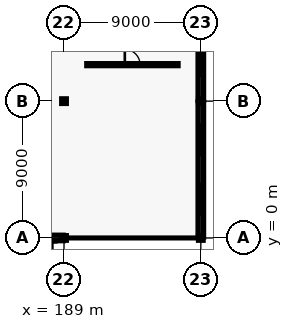
"""IFC4 building model, lengths in metres.
Left out: names, types, materials, properties, quantities, classifications, styles, units other than length and angle.
Written with IfcOpenShell. Run it as: python <this file> out.ifc"""

import sys

from ifc_helpers import new_model, si_unit, direction, frame, frame_2d, origin, origin_2d, place, context, subcontext, project, spatial, rectangle, i_section, extrude, element, fill, save


model = new_model("IFC4")
c1 = context("Model", 3, precision=1e-05, world=origin(), true_north=direction((0.0, 1.0)))
c2 = subcontext(c1, "Body", "Model", "MODEL_VIEW")
j1 = project(units=[si_unit("LENGTHUNIT", "METRE"), si_unit("PLANEANGLEUNIT", "RADIAN")], contexts=[c1])
p1 = place(None, origin())
s1 = spatial("IfcSite", under=j1, at=p1, CompositionType="ELEMENT")
p2 = place(p1, origin())
s2 = spatial("IfcBuilding", under=s1, at=p2, CompositionType="ELEMENT")
p3 = place(p2, frame((0.0, 0.0, 9.6)))
s3 = spatial("IfcBuildingStorey", under=s2, at=p3, CompositionType="ELEMENT", Elevation=9.6)
for number, where, z_axis, x_axis in (
    (1, (189.0, 0.0, 0.0), (0.0, 0.0, 1.0), (1.0, 0.0, 0.0)),
    (2, (189.0, 9.0, 0.0), (0.0, 0.0, 1.0), (1.0, 0.0, 0.0)),
    (3, (198.0, 0.0, 0.0), (0.0, 0.0, 1.0), (1.0, 0.0, 0.0)),
    (4, (198.0, 9.0, 0.0), (0.0, 0.0, 1.0), (1.0, 0.0, 0.0)),
):
    element("IfcColumn", number, at=place(p3, frame(where, z_axis=z_axis, x_axis=x_axis)), inside=s3, PredefinedType="COLUMN", context=c2, shape_type="SweptSolid", body=[
        extrude(i_section(OverallWidth=0.3, OverallDepth=0.3, WebThickness=0.011, FlangeThickness=0.019, FilletRadius=0.027, at=origin_2d()), origin(), (0.0, 0.0, 1.0), 3.9),
    ])
p4 = place(p3, frame((180.06, 0.0, 0.0), z_axis=(0.0, 0.0, 1.0), x_axis=(1.0, 0.0, 0.0)))
e5 = element("IfcWall", 5, at=p4, inside=s3, PredefinedType="SOLIDWALL", context=c2, shape_type="SweptSolid", body=[
    extrude(rectangle(XDim=8.88, YDim=0.36, at=frame_2d((4.44, 0.0))), origin(), (0.0, 0.0, 1.0), 3.25),
])
p5 = place(p4, frame((1.586, 0.0, 0.9)))
e6 = element("IfcOpeningElement", 6, at=p5, cuts=e5, PredefinedType="OPENING", context=c2, shape_type="SweptSolid", body=[
    extrude(rectangle(XDim=1.8, YDim=1.8, at=frame_2d((0.9, 0.9))), frame((0.0, 0.19, 0.0), z_axis=(0.0, -1.0, 0.0), x_axis=(1.0, 0.0, 0.0)), (0.0, 0.0, 1.0), 0.38),
])
p6 = place(p4, frame((5.494, 0.0, 0.9)))
e7 = element("IfcOpeningElement", 7, at=p6, cuts=e5, PredefinedType="OPENING", context=c2, shape_type="SweptSolid", body=[
    extrude(rectangle(XDim=1.8, YDim=1.8, at=frame_2d((0.9, 0.9))), frame((0.0, 0.19, 0.0), z_axis=(0.0, -1.0, 0.0), x_axis=(1.0, 0.0, 0.0)), (0.0, 0.0, 1.0), 0.38),
])
p7 = place(p3, frame((198.0, 0.06, 0.0), z_axis=(0.0, 0.0, 1.0), x_axis=(0.0, 1.0, 0.0)))
e8 = element("IfcWall", 8, at=p7, inside=s3, PredefinedType="SOLIDWALL", context=c2, shape_type="SweptSolid", body=[
    extrude(rectangle(XDim=8.88, YDim=0.36, at=frame_2d((4.44, 0.0))), origin(), (0.0, 0.0, 1.0), 3.25),
])
p8 = place(p7, frame((1.486, 0.0, 0.9)))
e9 = element("IfcOpeningElement", 9, at=p8, cuts=e8, PredefinedType="OPENING", context=c2, shape_type="SweptSolid", body=[
    extrude(rectangle(XDim=2.0, YDim=2.4, at=frame_2d((1.0, 1.2))), frame((0.0, 0.19, 0.0), z_axis=(0.0, -1.0, 0.0), x_axis=(1.0, 0.0, 0.0)), (0.0, 0.0, 1.0), 0.38),
])
p9 = place(p7, frame((5.394, 0.0, 0.9)))
e10 = element("IfcOpeningElement", 10, at=p9, cuts=e8, PredefinedType="OPENING", context=c2, shape_type="SweptSolid", body=[
    extrude(rectangle(XDim=2.0, YDim=2.4, at=frame_2d((1.0, 1.2))), frame((0.0, 0.19, 0.0), z_axis=(0.0, -1.0, 0.0), x_axis=(1.0, 0.0, 0.0)), (0.0, 0.0, 1.0), 0.38),
])
p10 = place(p3, frame((198.0, 9.06, 0.0), z_axis=(0.0, 0.0, 1.0), x_axis=(0.0, 1.0, 0.0)))
e11 = element("IfcWall", 11, at=p10, inside=s3, PredefinedType="SOLIDWALL", context=c2, shape_type="SweptSolid", body=[
    extrude(rectangle(XDim=8.88, YDim=0.36, at=frame_2d((4.44, 0.0))), origin(), (0.0, 0.0, 1.0), 3.25),
])
p11 = place(p10, frame((1.611, 0.0, 0.9)))
e12 = element("IfcOpeningElement", 12, at=p11, cuts=e11, PredefinedType="OPENING", context=c2, shape_type="SweptSolid", body=[
    extrude(rectangle(XDim=1.75, YDim=2.25, at=frame_2d((0.875, 1.125))), frame((0.0, 0.19, 0.0), z_axis=(0.0, -1.0, 0.0), x_axis=(1.0, 0.0, 0.0)), (0.0, 0.0, 1.0), 0.38),
])
p12 = place(p10, frame((5.519, 0.0, 0.9)))
e13 = element("IfcOpeningElement", 13, at=p12, cuts=e11, PredefinedType="OPENING", context=c2, shape_type="SweptSolid", body=[
    extrude(rectangle(XDim=1.75, YDim=2.25, at=frame_2d((0.875, 1.125))), frame((0.0, 0.19, 0.0), z_axis=(0.0, -1.0, 0.0), x_axis=(1.0, 0.0, 0.0)), (0.0, 0.0, 1.0), 0.38),
])
p13 = place(p3, frame((190.5, 11.4, 0.0), z_axis=(0.0, 0.0, 1.0), x_axis=(1.0, 0.0, 0.0)))
e14 = element("IfcWall", 14, at=p13, inside=s3, PredefinedType="PARTITIONING", context=c2, shape_type="SweptSolid", body=[
    extrude(rectangle(XDim=6.0, YDim=0.13, at=frame_2d((3.0, 0.0))), origin(), (0.0, 0.0, 1.0), 2.9),
])
p14 = place(p13, frame((2.5, 0.0, 0.0)))
e15 = element("IfcOpeningElement", 15, at=p14, cuts=e14, PredefinedType="OPENING", context=c2, shape_type="SweptSolid", body=[
    extrude(rectangle(XDim=1.0, YDim=2.1, at=frame_2d((0.5, 1.05))), frame((0.0, 0.075, 0.0), z_axis=(0.0, -1.0, 0.0), x_axis=(1.0, 0.0, 0.0)), (0.0, 0.0, 1.0), 0.15),
])
p15 = place(p8, origin())
e16 = element("IfcWindow", 16, at=p15, inside=s3, PartitioningType="SINGLE_PANEL", PredefinedType="WINDOW", context=c2, shape_type="SweptSolid", body=[
    extrude(rectangle(XDim=2.0, YDim=2.4, at=frame_2d((1.0, 1.2))), frame((0.0, 0.03, 0.0), z_axis=(0.0, -1.0, 0.0), x_axis=(1.0, 0.0, 0.0)), (0.0, 0.0, 1.0), 0.06),
])
fill(e9, e16)
p16 = place(p9, origin())
e17 = element("IfcWindow", 17, at=p16, inside=s3, PartitioningType="SINGLE_PANEL", PredefinedType="WINDOW", context=c2, shape_type="SweptSolid", body=[
    extrude(rectangle(XDim=2.0, YDim=2.4, at=frame_2d((1.0, 1.2))), frame((0.0, 0.03, 0.0), z_axis=(0.0, -1.0, 0.0), x_axis=(1.0, 0.0, 0.0)), (0.0, 0.0, 1.0), 0.06),
])
fill(e10, e17)
p17 = place(p11, origin())
e18 = element("IfcWindow", 18, at=p17, inside=s3, PartitioningType="SINGLE_PANEL", PredefinedType="WINDOW", context=c2, shape_type="SweptSolid", body=[
    extrude(rectangle(XDim=1.75, YDim=2.25, at=frame_2d((0.875, 1.125))), frame((0.0, 0.03, 0.0), z_axis=(0.0, -1.0, 0.0), x_axis=(1.0, 0.0, 0.0)), (0.0, 0.0, 1.0), 0.06),
])
fill(e12, e18)
p18 = place(p14, origin())
e19 = element("IfcDoor", 19, at=p18, inside=s3, OperationType="SINGLE_SWING_LEFT", PredefinedType="DOOR", context=c2, shape_type="SweptSolid", body=[
    extrude(rectangle(XDim=1.0, YDim=2.1, at=frame_2d((0.5, 1.05))), frame((0.0, 0.025, 0.0), z_axis=(0.0, -1.0, 0.0), x_axis=(1.0, 0.0, 0.0)), (0.0, 0.0, 1.0), 0.05),
])
fill(e15, e19)
save(model, sys.argv[1])
